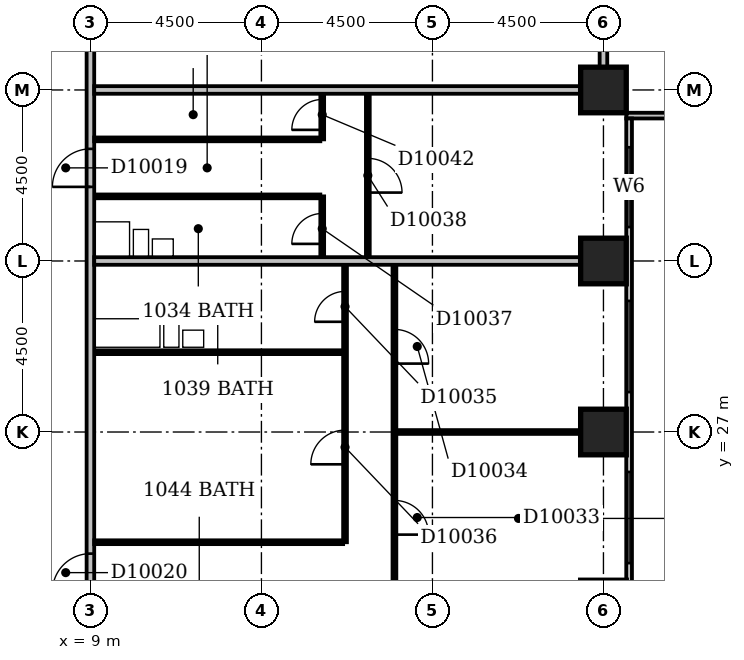
"""IFC4 building model, lengths in metres.
Left out: names, types, materials, properties, quantities, classifications, styles, units other than length and angle.
Written with IfcOpenShell. Run it as: python <this file> out.ifc"""

import sys

from ifc_helpers import new_model, si_unit, direction, frame, frame_2d, origin, origin_2d, place, context, subcontext, project, spatial, rectangle, extrude, element, fill, save


model = new_model("IFC4")
c1 = context("Model", 3, precision=1e-05, world=origin(), true_north=direction((0.0, 1.0)))
c2 = subcontext(c1, "Body", "Model", "MODEL_VIEW")
j1 = project(units=[si_unit("LENGTHUNIT", "METRE"), si_unit("PLANEANGLEUNIT", "RADIAN")], contexts=[c1])
p1 = place(None, origin())
s1 = spatial("IfcSite", under=j1, at=p1, CompositionType="ELEMENT")
p2 = place(p1, origin())
s2 = spatial("IfcBuilding", under=s1, at=p2, CompositionType="ELEMENT")
p3 = place(p2, frame((0.0, 0.0, 47.0)))
s3 = spatial("IfcBuildingStorey", under=s2, at=p3, CompositionType="ELEMENT", Elevation=47.0)
for number, where, z_axis, x_axis in (
    (1, (22.5, 27.0, -0.3), (0.0, 0.0, 1.0), (1.0, 0.0, 0.0)),
    (2, (22.5, 31.5, -0.3), (0.0, 0.0, 1.0), (1.0, 0.0, 0.0)),
    (3, (22.5, 36.0, -0.3), (0.0, 0.0, 1.0), (1.0, 0.0, 0.0)),
):
    element("IfcColumn", number, at=place(p3, frame(where, z_axis=z_axis, x_axis=x_axis)), inside=s3, PredefinedType="COLUMN", context=c2, shape_type="SweptSolid", body=[
        extrude(rectangle(XDim=1.2, YDim=1.2, at=origin_2d()), origin(), (0.0, 0.0, 1.0), 3.6),
    ])
p4 = place(p3, frame((23.175, 17.4, 0.0), z_axis=(0.0, 0.0, 1.0), x_axis=(0.0, 1.0, 0.0)))
e4 = element("IfcWall", 4, at=p4, inside=s3, PredefinedType="STANDARD", context=c2, shape_type="SweptSolid", body=[
    extrude(rectangle(XDim=17.85, YDim=0.15, at=frame_2d((8.925, 0.0))), origin(), (0.0, 0.0, 1.0), 2.7),
])
p5 = place(p4, frame((3.03, 0.0, 0.6)))
e5 = element("IfcOpeningElement", 5, at=p5, cuts=e4, PredefinedType="OPENING", context=c2, shape_type="SweptSolid", body=[
    extrude(rectangle(XDim=1.2, YDim=1.8, at=frame_2d((0.6, 0.9))), frame((0.0, 0.087, 0.0), z_axis=(0.0, -1.0, 0.0), x_axis=(1.0, 0.0, 0.0)), (0.0, 0.0, 1.0), 0.174),
])
p6 = place(p4, frame((6.15, 0.0, 0.6)))
e6 = element("IfcOpeningElement", 6, at=p6, cuts=e4, PredefinedType="OPENING", context=c2, shape_type="SweptSolid", body=[
    extrude(rectangle(XDim=2.4, YDim=1.8, at=frame_2d((1.2, 0.9))), frame((0.0, 0.087, 0.0), z_axis=(0.0, -1.0, 0.0), x_axis=(1.0, 0.0, 0.0)), (0.0, 0.0, 1.0), 0.174),
])
p7 = place(p4, frame((10.65, 0.0, 0.6)))
e7 = element("IfcOpeningElement", 7, at=p7, cuts=e4, PredefinedType="OPENING", context=c2, shape_type="SweptSolid", body=[
    extrude(rectangle(XDim=2.4, YDim=1.8, at=frame_2d((1.2, 0.9))), frame((0.0, 0.087, 0.0), z_axis=(0.0, -1.0, 0.0), x_axis=(1.0, 0.0, 0.0)), (0.0, 0.0, 1.0), 0.174),
])
p8 = place(p4, frame((14.992, 0.0, 0.6)))
e8 = element("IfcOpeningElement", 8, at=p8, cuts=e4, PredefinedType="OPENING", context=c2, shape_type="SweptSolid", body=[
    extrude(rectangle(XDim=2.1, YDim=1.8, at=frame_2d((1.05, 0.9))), frame((0.0, 0.087, 0.0), z_axis=(0.0, -1.0, 0.0), x_axis=(1.0, 0.0, 0.0)), (0.0, 0.0, 1.0), 0.174),
])
p9 = place(p3, frame((23.1, 35.325, 0.0), z_axis=(0.0, 0.0, 1.0), x_axis=(1.0, 0.0, 0.0)))
e9 = element("IfcWall", 9, at=p9, inside=s3, PredefinedType="STANDARD", context=c2, shape_type="SweptSolid", body=[
    extrude(rectangle(XDim=45.15, YDim=0.15, at=frame_2d((22.575, 0.0))), origin(), (0.0, 0.0, 1.0), 2.7),
])
p10 = place(p9, frame((2.386, 0.0, 0.6)))
e10 = element("IfcOpeningElement", 10, at=p10, cuts=e9, PredefinedType="OPENING", context=c2, shape_type="SweptSolid", body=[
    extrude(rectangle(XDim=0.6, YDim=1.8, at=frame_2d((0.3, 0.9))), frame((0.0, 0.087, 0.0), z_axis=(0.0, -1.0, 0.0), x_axis=(1.0, 0.0, 0.0)), (0.0, 0.0, 1.0), 0.174),
])
p11 = place(p9, frame((4.95, 0.0, 0.6)))
e11 = element("IfcOpeningElement", 11, at=p11, cuts=e9, PredefinedType="OPENING", context=c2, shape_type="SweptSolid", body=[
    extrude(rectangle(XDim=2.4, YDim=1.8, at=frame_2d((1.2, 0.9))), frame((0.0, 0.087, 0.0), z_axis=(0.0, -1.0, 0.0), x_axis=(1.0, 0.0, 0.0)), (0.0, 0.0, 1.0), 0.174),
])
p12 = place(p9, frame((9.45, 0.0, 0.6)))
e12 = element("IfcOpeningElement", 12, at=p12, cuts=e9, PredefinedType="OPENING", context=c2, shape_type="SweptSolid", body=[
    extrude(rectangle(XDim=2.4, YDim=1.8, at=frame_2d((1.2, 0.9))), frame((0.0, 0.087, 0.0), z_axis=(0.0, -1.0, 0.0), x_axis=(1.0, 0.0, 0.0)), (0.0, 0.0, 1.0), 0.174),
])
p13 = place(p9, frame((13.95, 0.0, 0.6)))
e13 = element("IfcOpeningElement", 13, at=p13, cuts=e9, PredefinedType="OPENING", context=c2, shape_type="SweptSolid", body=[
    extrude(rectangle(XDim=2.4, YDim=1.8, at=frame_2d((1.2, 0.9))), frame((0.0, 0.087, 0.0), z_axis=(0.0, -1.0, 0.0), x_axis=(1.0, 0.0, 0.0)), (0.0, 0.0, 1.0), 0.174),
])
p14 = place(p9, frame((18.45, 0.0, 0.6)))
e14 = element("IfcOpeningElement", 14, at=p14, cuts=e9, PredefinedType="OPENING", context=c2, shape_type="SweptSolid", body=[
    extrude(rectangle(XDim=2.4, YDim=1.8, at=frame_2d((1.2, 0.9))), frame((0.0, 0.087, 0.0), z_axis=(0.0, -1.0, 0.0), x_axis=(1.0, 0.0, 0.0)), (0.0, 0.0, 1.0), 0.174),
])
p15 = place(p9, frame((22.83, 0.0, 0.6)))
e15 = element("IfcOpeningElement", 15, at=p15, cuts=e9, PredefinedType="OPENING", context=c2, shape_type="SweptSolid", body=[
    extrude(rectangle(XDim=1.5, YDim=1.8, at=frame_2d((0.75, 0.9))), frame((0.0, 0.087, 0.0), z_axis=(0.0, -1.0, 0.0), x_axis=(1.0, 0.0, 0.0)), (0.0, 0.0, 1.0), 0.174),
])
p16 = place(p9, frame((28.894, 0.0, 0.6)))
e16 = element("IfcOpeningElement", 16, at=p16, cuts=e9, PredefinedType="OPENING", context=c2, shape_type="SweptSolid", body=[
    extrude(rectangle(XDim=1.2, YDim=1.8, at=frame_2d((0.6, 0.9))), frame((0.0, 0.087, 0.0), z_axis=(0.0, -1.0, 0.0), x_axis=(1.0, 0.0, 0.0)), (0.0, 0.0, 1.0), 0.174),
])
p17 = place(p9, frame((31.95, 0.0, 0.6)))
e17 = element("IfcOpeningElement", 17, at=p17, cuts=e9, PredefinedType="OPENING", context=c2, shape_type="SweptSolid", body=[
    extrude(rectangle(XDim=2.4, YDim=1.8, at=frame_2d((1.2, 0.9))), frame((0.0, 0.087, 0.0), z_axis=(0.0, -1.0, 0.0), x_axis=(1.0, 0.0, 0.0)), (0.0, 0.0, 1.0), 0.174),
])
p18 = place(p9, frame((36.45, 0.0, 0.6)))
e18 = element("IfcOpeningElement", 18, at=p18, cuts=e9, PredefinedType="OPENING", context=c2, shape_type="SweptSolid", body=[
    extrude(rectangle(XDim=2.4, YDim=1.8, at=frame_2d((1.2, 0.9))), frame((0.0, 0.087, 0.0), z_axis=(0.0, -1.0, 0.0), x_axis=(1.0, 0.0, 0.0)), (0.0, 0.0, 1.0), 0.174),
])
p19 = place(p9, frame((40.95, 0.0, 0.6)))
e19 = element("IfcOpeningElement", 19, at=p19, cuts=e9, PredefinedType="OPENING", context=c2, shape_type="SweptSolid", body=[
    extrude(rectangle(XDim=2.4, YDim=1.8, at=frame_2d((1.2, 0.9))), frame((0.0, 0.087, 0.0), z_axis=(0.0, -1.0, 0.0), x_axis=(1.0, 0.0, 0.0)), (0.0, 0.0, 1.0), 0.174),
])
p20 = place(p3, frame((9.0, 5.0, 0.0), z_axis=(0.0, 0.0, 1.0), x_axis=(0.0, 1.0, 0.0)))
e20 = element("IfcWall", 20, at=p20, inside=s3, PredefinedType="PARTITIONING", context=c2, shape_type="SweptSolid", body=[
    extrude(rectangle(XDim=44.5, YDim=0.2, at=frame_2d((22.25, 0.0))), origin(), (0.0, 0.0, 1.0), 3.3),
])
p21 = place(p20, frame((28.45, 0.0, 0.0)))
e21 = element("IfcOpeningElement", 21, at=p21, cuts=e20, PredefinedType="OPENING", context=c2, shape_type="SweptSolid", body=[
    extrude(rectangle(XDim=1.0, YDim=2.1, at=frame_2d((0.5, 1.05))), frame((0.0, 0.112, 0.0), z_axis=(0.0, -1.0, 0.0), x_axis=(1.0, 0.0, 0.0)), (0.0, 0.0, 1.0), 0.224),
])
p22 = place(p20, frame((17.8, 0.0, 0.0)))
e22 = element("IfcOpeningElement", 22, at=p22, cuts=e20, PredefinedType="OPENING", context=c2, shape_type="SweptSolid", body=[
    extrude(rectangle(XDim=1.0, YDim=2.1, at=frame_2d((0.5, 1.05))), frame((0.0, 0.112, 0.0), z_axis=(0.0, -1.0, 0.0), x_axis=(1.0, 0.0, 0.0)), (0.0, 0.0, 1.0), 0.224),
])
p23 = place(p20, frame((14.55, 0.0, 0.0)))
e23 = element("IfcOpeningElement", 23, at=p23, cuts=e20, PredefinedType="OPENING", context=c2, shape_type="SweptSolid", body=[
    extrude(rectangle(XDim=1.0, YDim=2.1, at=frame_2d((0.5, 1.05))), frame((0.0, 0.112, 0.0), z_axis=(0.0, -1.0, 0.0), x_axis=(1.0, 0.0, 0.0)), (0.0, 0.0, 1.0), 0.224),
])
p24 = place(p20, frame((11.7, 0.0, 0.0)))
e24 = element("IfcOpeningElement", 24, at=p24, cuts=e20, PredefinedType="OPENING", context=c2, shape_type="SweptSolid", body=[
    extrude(rectangle(XDim=1.0, YDim=2.1, at=frame_2d((0.5, 1.05))), frame((0.0, 0.112, 0.0), z_axis=(0.0, -1.0, 0.0), x_axis=(1.0, 0.0, 0.0)), (0.0, 0.0, 1.0), 0.224),
])
p25 = place(p20, frame((35.0, 0.0, 0.0)))
e25 = element("IfcOpeningElement", 25, at=p25, cuts=e20, PredefinedType="OPENING", context=c2, shape_type="SweptSolid", body=[
    extrude(rectangle(XDim=0.9, YDim=2.1, at=frame_2d((0.45, 1.05))), frame((0.0, 0.112, 0.0), z_axis=(0.0, -1.0, 0.0), x_axis=(1.0, 0.0, 0.0)), (0.0, 0.0, 1.0), 0.224),
])
p26 = place(p20, frame((1.5, 0.0, 0.0)))
e26 = element("IfcOpeningElement", 26, at=p26, cuts=e20, PredefinedType="OPENING", context=c2, shape_type="SweptSolid", body=[
    extrude(rectangle(XDim=0.9, YDim=2.1, at=frame_2d((0.45, 1.05))), frame((0.0, 0.112, 0.0), z_axis=(0.0, -1.0, 0.0), x_axis=(1.0, 0.0, 0.0)), (0.0, 0.0, 1.0), 0.224),
])
p27 = place(p3, frame((17.0, 22.6, 0.0), z_axis=(0.0, 0.0, 1.0), x_axis=(0.0, 1.0, 0.0)))
e27 = element("IfcWall", 27, at=p27, inside=s3, PredefinedType="PARTITIONING", context=c2, shape_type="SweptSolid", body=[
    extrude(rectangle(XDim=8.8, YDim=0.1, at=frame_2d((4.4, 0.0))), origin(), (0.0, 0.0, 1.0), 3.3),
])
p28 = place(p27, frame((1.7, 0.0, 0.0)))
e28 = element("IfcOpeningElement", 28, at=p28, cuts=e27, PredefinedType="OPENING", context=c2, shape_type="SweptSolid", body=[
    extrude(rectangle(XDim=0.9, YDim=2.1, at=frame_2d((0.45, 1.05))), frame((0.0, 0.062, 0.0), z_axis=(0.0, -1.0, 0.0), x_axis=(1.0, 0.0, 0.0)), (0.0, 0.0, 1.0), 0.124),
])
p29 = place(p27, frame((6.2, 0.0, 0.0)))
e29 = element("IfcOpeningElement", 29, at=p29, cuts=e27, PredefinedType="OPENING", context=c2, shape_type="SweptSolid", body=[
    extrude(rectangle(XDim=0.9, YDim=2.1, at=frame_2d((0.45, 1.05))), frame((0.0, 0.062, 0.0), z_axis=(0.0, -1.0, 0.0), x_axis=(1.0, 0.0, 0.0)), (0.0, 0.0, 1.0), 0.124),
])
p30 = place(p3, frame((9.1, 24.1, 0.0), z_axis=(0.0, 0.0, 1.0), x_axis=(1.0, 0.0, 0.0)))
e30 = element("IfcWall", 30, at=p30, inside=s3, PredefinedType="PARTITIONING", context=c2, shape_type="SweptSolid", body=[
    extrude(rectangle(XDim=6.55, YDim=0.1, at=frame_2d((3.275, 0.0))), origin(), (0.0, 0.0, 1.0), 3.3),
])
p31 = place(p3, frame((15.7, 24.1, 0.0), z_axis=(0.0, 0.0, 1.0), x_axis=(0.0, 1.0, 0.0)))
e31 = element("IfcWall", 31, at=p31, inside=s3, PredefinedType="PARTITIONING", context=c2, shape_type="SweptSolid", body=[
    extrude(rectangle(XDim=7.3, YDim=0.1, at=frame_2d((3.65, 0.0))), origin(), (0.0, 0.0, 1.0), 3.3),
])
p32 = place(p31, frame((5.8, 0.0, 0.0)))
e32 = element("IfcOpeningElement", 32, at=p32, cuts=e31, PredefinedType="OPENING", context=c2, shape_type="SweptSolid", body=[
    extrude(rectangle(XDim=0.8, YDim=2.1, at=frame_2d((0.4, 1.05))), frame((0.0, 0.062, 0.0), z_axis=(0.0, -1.0, 0.0), x_axis=(1.0, 0.0, 0.0)), (0.0, 0.0, 1.0), 0.124),
])
p33 = place(p31, frame((2.05, 0.0, 0.0)))
e33 = element("IfcOpeningElement", 33, at=p33, cuts=e31, PredefinedType="OPENING", context=c2, shape_type="SweptSolid", body=[
    extrude(rectangle(XDim=0.9, YDim=2.1, at=frame_2d((0.45, 1.05))), frame((0.0, 0.062, 0.0), z_axis=(0.0, -1.0, 0.0), x_axis=(1.0, 0.0, 0.0)), (0.0, 0.0, 1.0), 0.124),
])
p34 = place(p3, frame((17.05, 27.0, 0.0), z_axis=(0.0, 0.0, 1.0), x_axis=(1.0, 0.0, 0.0)))
e34 = element("IfcWall", 34, at=p34, inside=s3, PredefinedType="PARTITIONING", context=c2, shape_type="SweptSolid", body=[
    extrude(rectangle(XDim=4.85, YDim=0.1, at=frame_2d((2.425, 0.0))), origin(), (0.0, 0.0, 1.0), 2.7),
])
p35 = place(p3, frame((9.1, 29.1, 0.0), z_axis=(0.0, 0.0, 1.0), x_axis=(1.0, 0.0, 0.0)))
e35 = element("IfcWall", 35, at=p35, inside=s3, PredefinedType="PLUMBINGWALL", context=c2, shape_type="SweptSolid", body=[
    extrude(rectangle(XDim=6.55, YDim=0.1, at=frame_2d((3.275, 0.0))), origin(), (0.0, 0.0, 1.0), 3.3),
])
p36 = place(p3, frame((9.1, 31.5, 0.0), z_axis=(0.0, 0.0, 1.0), x_axis=(1.0, 0.0, 0.0)))
e36 = element("IfcWall", 36, at=p36, inside=s3, PredefinedType="PARTITIONING", context=c2, shape_type="SweptSolid", body=[
    extrude(rectangle(XDim=12.8, YDim=0.2, at=frame_2d((6.4, 0.0))), origin(), (0.0, 0.0, 1.0), 3.3),
])
p37 = place(p3, frame((15.1, 31.6, 0.0), z_axis=(0.0, 0.0, 1.0), x_axis=(0.0, 1.0, 0.0)))
e37 = element("IfcWall", 37, at=p37, inside=s3, PredefinedType="PARTITIONING", context=c2, shape_type="SweptSolid", body=[
    extrude(rectangle(XDim=1.6, YDim=0.1, at=frame_2d((0.8, 0.0))), origin(), (0.0, 0.0, 1.0), 3.3),
])
p38 = place(p37, frame((0.35, 0.0, 0.0)))
e38 = element("IfcOpeningElement", 38, at=p38, cuts=e37, PredefinedType="OPENING", context=c2, shape_type="SweptSolid", body=[
    extrude(rectangle(XDim=0.8, YDim=2.1, at=frame_2d((0.4, 1.05))), frame((0.0, 0.062, 0.0), z_axis=(0.0, -1.0, 0.0), x_axis=(1.0, 0.0, 0.0)), (0.0, 0.0, 1.0), 0.124),
])
p39 = place(p3, frame((16.3, 31.6, 0.0), z_axis=(0.0, 0.0, 1.0), x_axis=(0.0, 1.0, 0.0)))
e39 = element("IfcWall", 39, at=p39, inside=s3, PredefinedType="PARTITIONING", context=c2, shape_type="SweptSolid", body=[
    extrude(rectangle(XDim=4.3, YDim=0.1, at=frame_2d((2.15, 0.0))), origin(), (0.0, 0.0, 1.0), 3.3),
])
p40 = place(p39, frame((1.7, 0.0, 0.0)))
e40 = element("IfcOpeningElement", 40, at=p40, cuts=e39, PredefinedType="OPENING", context=c2, shape_type="SweptSolid", body=[
    extrude(rectangle(XDim=0.9, YDim=2.1, at=frame_2d((0.45, 1.05))), frame((0.0, 0.062, 0.0), z_axis=(0.0, -1.0, 0.0), x_axis=(1.0, 0.0, 0.0)), (0.0, 0.0, 1.0), 0.124),
])
p41 = place(p3, frame((9.1, 33.2, 0.0), z_axis=(0.0, 0.0, 1.0), x_axis=(1.0, 0.0, 0.0)))
e41 = element("IfcWall", 41, at=p41, inside=s3, PredefinedType="PLUMBINGWALL", context=c2, shape_type="SweptSolid", body=[
    extrude(rectangle(XDim=5.95, YDim=0.1, at=frame_2d((2.975, 0.0))), origin(), (0.0, 0.0, 1.0), 3.3),
])
p42 = place(p3, frame((9.1, 34.7, 0.0), z_axis=(0.0, 0.0, 1.0), x_axis=(1.0, 0.0, 0.0)))
e42 = element("IfcWall", 42, at=p42, inside=s3, PredefinedType="PARTITIONING", context=c2, shape_type="SweptSolid", body=[
    extrude(rectangle(XDim=5.95, YDim=0.1, at=frame_2d((2.975, 0.0))), origin(), (0.0, 0.0, 1.0), 3.3),
])
p43 = place(p3, frame((15.1, 34.7, 0.0), z_axis=(0.0, 0.0, 1.0), x_axis=(0.0, 1.0, 0.0)))
e43 = element("IfcWall", 43, at=p43, inside=s3, PredefinedType="PARTITIONING", context=c2, shape_type="SweptSolid", body=[
    extrude(rectangle(XDim=1.2, YDim=0.1, at=frame_2d((0.6, 0.0))), origin(), (0.0, 0.0, 1.0), 3.3),
])
p44 = place(p43, frame((0.25, 0.0, 0.0)))
e44 = element("IfcOpeningElement", 44, at=p44, cuts=e43, PredefinedType="OPENING", context=c2, shape_type="SweptSolid", body=[
    extrude(rectangle(XDim=0.8, YDim=2.1, at=frame_2d((0.4, 1.05))), frame((0.0, 0.062, 0.0), z_axis=(0.0, -1.0, 0.0), x_axis=(1.0, 0.0, 0.0)), (0.0, 0.0, 1.0), 0.124),
])
p45 = place(p3, frame((9.1, 36.0, 0.0), z_axis=(0.0, 0.0, 1.0), x_axis=(1.0, 0.0, 0.0)))
e45 = element("IfcWall", 45, at=p45, inside=s3, PredefinedType="PARTITIONING", context=c2, shape_type="SweptSolid", body=[
    extrude(rectangle(XDim=12.8, YDim=0.2, at=frame_2d((6.4, 0.0))), origin(), (0.0, 0.0, 1.0), 2.4),
])
p46 = place(p3, frame((22.5, 36.6, 0.0), z_axis=(0.0, 0.0, 1.0), x_axis=(0.0, 1.0, 0.0)))
e46 = element("IfcWall", 46, at=p46, inside=s3, PredefinedType="PARTITIONING", context=c2, shape_type="SweptSolid", body=[
    extrude(rectangle(XDim=12.8, YDim=0.2, at=frame_2d((6.4, 0.0))), origin(), (0.0, 0.0, 1.0), 3.3),
])
p47 = place(p6, origin())
e47 = element("IfcWindow", 47, at=p47, inside=s3, PartitioningType="SINGLE_PANEL", PredefinedType="WINDOW", context=c2, shape_type="SweptSolid", body=[
    extrude(rectangle(XDim=2.4, YDim=1.8, at=frame_2d((1.2, 0.9))), frame((0.0, 0.03, 0.0), z_axis=(0.0, -1.0, 0.0), x_axis=(1.0, 0.0, 0.0)), (0.0, 0.0, 1.0), 0.06),
])
fill(e6, e47)
p48 = place(p7, origin())
e48 = element("IfcWindow", 48, at=p48, inside=s3, PartitioningType="SINGLE_PANEL", PredefinedType="WINDOW", context=c2, shape_type="SweptSolid", body=[
    extrude(rectangle(XDim=2.4, YDim=1.8, at=frame_2d((1.2, 0.9))), frame((0.0, 0.03, 0.0), z_axis=(0.0, -1.0, 0.0), x_axis=(1.0, 0.0, 0.0)), (0.0, 0.0, 1.0), 0.06),
])
fill(e7, e48)
p49 = place(p8, origin())
e49 = element("IfcWindow", 49, at=p49, inside=s3, PartitioningType="SINGLE_PANEL", PredefinedType="WINDOW", context=c2, shape_type="SweptSolid", body=[
    extrude(rectangle(XDim=2.1, YDim=1.8, at=frame_2d((1.05, 0.9))), frame((0.0, 0.03, 0.0), z_axis=(0.0, -1.0, 0.0), x_axis=(1.0, 0.0, 0.0)), (0.0, 0.0, 1.0), 0.06),
])
fill(e8, e49)
p50 = place(p21, origin())
e50 = element("IfcDoor", 50, at=p50, inside=s3, OperationType="SINGLE_SWING_LEFT", PredefinedType="DOOR", context=c2, shape_type="SweptSolid", body=[
    extrude(rectangle(XDim=1.0, YDim=2.1, at=frame_2d((0.5, 1.05))), frame((0.0, 0.025, 0.0), z_axis=(0.0, -1.0, 0.0), x_axis=(1.0, 0.0, 0.0)), (0.0, 0.0, 1.0), 0.05),
])
fill(e21, e50)
p51 = place(p22, origin())
e51 = element("IfcDoor", 51, at=p51, inside=s3, OperationType="SINGLE_SWING_LEFT", PredefinedType="DOOR", context=c2, shape_type="SweptSolid", body=[
    extrude(rectangle(XDim=1.0, YDim=2.1, at=frame_2d((0.5, 1.05))), frame((0.0, 0.025, 0.0), z_axis=(0.0, -1.0, 0.0), x_axis=(1.0, 0.0, 0.0)), (0.0, 0.0, 1.0), 0.05),
])
fill(e22, e51)
p52 = place(p28, frame((0.9, 0.0, 0.0), z_axis=(0.0, 0.0, 1.0), x_axis=(-1.0, 0.0, 0.0)))
e52 = element("IfcDoor", 52, at=p52, inside=s3, OperationType="SINGLE_SWING_RIGHT", PredefinedType="DOOR", context=c2, shape_type="SweptSolid", body=[
    extrude(rectangle(XDim=0.9, YDim=2.1, at=frame_2d((0.45, 1.05))), frame((0.0, 0.025, 0.0), z_axis=(0.0, -1.0, 0.0), x_axis=(1.0, 0.0, 0.0)), (0.0, 0.0, 1.0), 0.05),
])
fill(e28, e52)
p53 = place(p29, frame((0.9, 0.0, 0.0), z_axis=(0.0, 0.0, 1.0), x_axis=(-1.0, 0.0, 0.0)))
e53 = element("IfcDoor", 53, at=p53, inside=s3, OperationType="SINGLE_SWING_RIGHT", PredefinedType="DOOR", context=c2, shape_type="SweptSolid", body=[
    extrude(rectangle(XDim=0.9, YDim=2.1, at=frame_2d((0.45, 1.05))), frame((0.0, 0.025, 0.0), z_axis=(0.0, -1.0, 0.0), x_axis=(1.0, 0.0, 0.0)), (0.0, 0.0, 1.0), 0.05),
])
fill(e29, e53)
p54 = place(p32, origin())
e54 = element("IfcDoor", 54, at=p54, inside=s3, OperationType="SINGLE_SWING_LEFT", PredefinedType="DOOR", context=c2, shape_type="SweptSolid", body=[
    extrude(rectangle(XDim=0.8, YDim=2.1, at=frame_2d((0.4, 1.05))), frame((0.0, 0.025, 0.0), z_axis=(0.0, -1.0, 0.0), x_axis=(1.0, 0.0, 0.0)), (0.0, 0.0, 1.0), 0.05),
])
fill(e32, e54)
p55 = place(p33, origin())
e55 = element("IfcDoor", 55, at=p55, inside=s3, OperationType="SINGLE_SWING_LEFT", PredefinedType="DOOR", context=c2, shape_type="SweptSolid", body=[
    extrude(rectangle(XDim=0.9, YDim=2.1, at=frame_2d((0.45, 1.05))), frame((0.0, 0.025, 0.0), z_axis=(0.0, -1.0, 0.0), x_axis=(1.0, 0.0, 0.0)), (0.0, 0.0, 1.0), 0.05),
])
fill(e33, e55)
p56 = place(p38, origin())
e56 = element("IfcDoor", 56, at=p56, inside=s3, OperationType="SINGLE_SWING_LEFT", PredefinedType="DOOR", context=c2, shape_type="SweptSolid", body=[
    extrude(rectangle(XDim=0.8, YDim=2.1, at=frame_2d((0.4, 1.05))), frame((0.0, 0.025, 0.0), z_axis=(0.0, -1.0, 0.0), x_axis=(1.0, 0.0, 0.0)), (0.0, 0.0, 1.0), 0.05),
])
fill(e38, e56)
p57 = place(p40, frame((0.9, 0.0, 0.0), z_axis=(0.0, 0.0, 1.0), x_axis=(-1.0, 0.0, 0.0)))
e57 = element("IfcDoor", 57, at=p57, inside=s3, OperationType="SINGLE_SWING_RIGHT", PredefinedType="DOOR", context=c2, shape_type="SweptSolid", body=[
    extrude(rectangle(XDim=0.9, YDim=2.1, at=frame_2d((0.45, 1.05))), frame((0.0, 0.025, 0.0), z_axis=(0.0, -1.0, 0.0), x_axis=(1.0, 0.0, 0.0)), (0.0, 0.0, 1.0), 0.05),
])
fill(e40, e57)
p58 = place(p44, origin())
e58 = element("IfcDoor", 58, at=p58, inside=s3, OperationType="SINGLE_SWING_LEFT", PredefinedType="DOOR", context=c2, shape_type="SweptSolid", body=[
    extrude(rectangle(XDim=0.8, YDim=2.1, at=frame_2d((0.4, 1.05))), frame((0.0, 0.025, 0.0), z_axis=(0.0, -1.0, 0.0), x_axis=(1.0, 0.0, 0.0)), (0.0, 0.0, 1.0), 0.05),
])
fill(e44, e58)
save(model, sys.argv[1])
